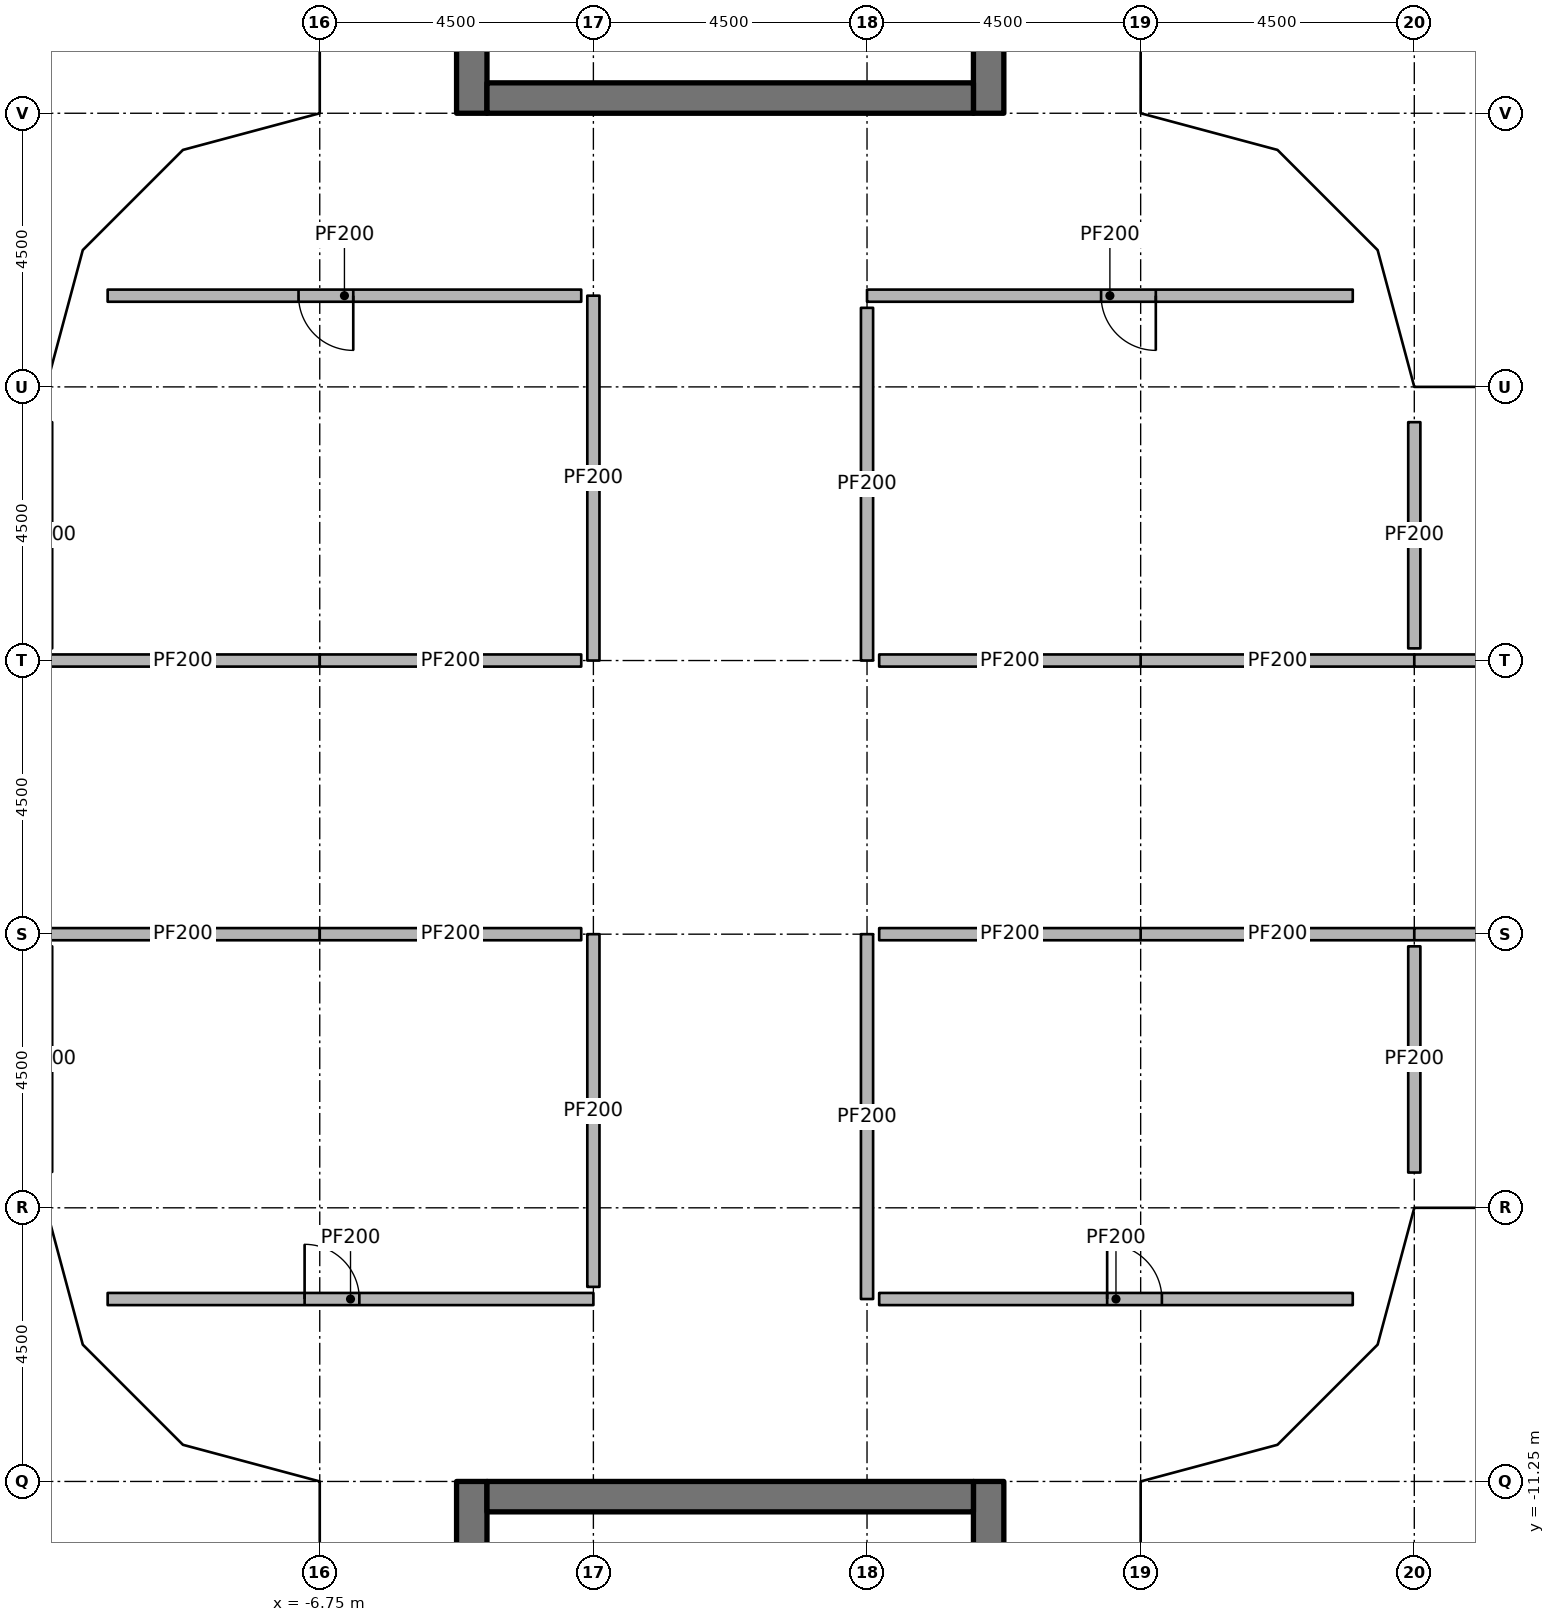
"""IFC4 building model, lengths in metres.
Left out: names, types, materials, properties, quantities, classifications, styles, units other than length and angle.
Written with IfcOpenShell. Run it as: python <this file> out.ifc"""

import sys

from ifc_helpers import new_model, si_unit, direction, frame, frame_2d, origin, origin_2d, place, context, subcontext, project, spatial, rectangle, extrude, element, fill, save


model = new_model("IFC4")
c1 = context("Model", 3, precision=1e-05, world=origin(), true_north=direction((0.0, 1.0)))
c2 = subcontext(c1, "Body", "Model", "MODEL_VIEW")
j1 = project(units=[si_unit("LENGTHUNIT", "METRE"), si_unit("PLANEANGLEUNIT", "RADIAN")], contexts=[c1])
p1 = place(None, origin())
s1 = spatial("IfcSite", under=j1, at=p1, CompositionType="ELEMENT")
p2 = place(p1, origin())
s2 = spatial("IfcBuilding", under=s1, at=p2, CompositionType="ELEMENT")
p3 = place(p2, frame((0.0, 0.0, 291.6)))
s3 = spatial("IfcBuildingStorey", under=s2, at=p3, CompositionType="ELEMENT", Elevation=291.6)
for number, where, z_axis, x_axis in (
    (1, (-10.75, -6.25, 0.0), (0.0, 0.0, 1.0), (1.0, 0.0, 0.0)),
    (2, (-10.75, 6.25, 0.0), (0.0, 0.0, 1.0), (1.0, 0.0, 0.0)),
    (3, (-6.25, -10.75, 0.0), (0.0, 0.0, 1.0), (1.0, 0.0, 0.0)),
    (4, (-6.25, -6.25, 0.0), (0.0, 0.0, 1.0), (1.0, 0.0, 0.0)),
    (5, (-6.25, 6.25, 0.0), (0.0, 0.0, 1.0), (1.0, 0.0, 0.0)),
    (6, (-6.25, 10.75, 0.0), (0.0, 0.0, 1.0), (1.0, 0.0, 0.0)),
    (7, (6.25, -10.75, 0.0), (0.0, 0.0, 1.0), (1.0, 0.0, 0.0)),
    (8, (6.25, -6.25, 0.0), (0.0, 0.0, 1.0), (1.0, 0.0, 0.0)),
    (9, (6.25, 6.25, 0.0), (0.0, 0.0, 1.0), (1.0, 0.0, 0.0)),
    (10, (6.25, 10.75, 0.0), (0.0, 0.0, 1.0), (1.0, 0.0, 0.0)),
    (11, (10.75, -6.25, 0.0), (0.0, 0.0, 1.0), (1.0, 0.0, 0.0)),
    (12, (10.75, 6.25, 0.0), (0.0, 0.0, 1.0), (1.0, 0.0, 0.0)),
):
    element("IfcColumn", number, at=place(p3, frame(where, z_axis=z_axis, x_axis=x_axis)), inside=s3, PredefinedType="COLUMN", context=c2, shape_type="SweptSolid", body=[
        extrude(rectangle(XDim=0.6, YDim=0.6, at=origin_2d()), origin(), (0.0, 0.0, 1.0), 3.45),
    ])
p4 = place(p3, frame((-4.25, 11.25, 0.0), z_axis=(0.0, 0.0, 1.0), x_axis=(0.0, 1.0, 0.0)))
e13 = element("IfcWall", 13, at=p4, inside=s3, PredefinedType="SHEAR", context=c2, shape_type="SweptSolid", body=[
    extrude(rectangle(XDim=15.0, YDim=0.5, at=frame_2d((7.5, 0.0))), origin(), (0.0, 0.0, 1.0), 3.6),
])
p5 = place(p4, frame((7.15, 0.0, 0.0)))
e14 = element("IfcOpeningElement", 14, at=p5, cuts=e13, PredefinedType="OPENING", context=c2, shape_type="SweptSolid", body=[
    extrude(rectangle(XDim=1.5, YDim=2.3, at=frame_2d((0.75, 1.15))), frame((0.0, 0.26, 0.0), z_axis=(0.0, -1.0, 0.0), x_axis=(1.0, 0.0, 0.0)), (0.0, 0.0, 1.0), 0.52),
])
p6 = place(p4, frame((13.9, 0.0, 0.0)))
e15 = element("IfcOpeningElement", 15, at=p6, cuts=e13, PredefinedType="OPENING", context=c2, shape_type="SweptSolid", body=[
    extrude(rectangle(XDim=0.9, YDim=2.1, at=frame_2d((0.45, 1.05))), frame((0.0, 0.26, 0.0), z_axis=(0.0, -1.0, 0.0), x_axis=(1.0, 0.0, 0.0)), (0.0, 0.0, 1.0), 0.52),
])
p7 = place(p4, frame((1.15, 0.0, 0.0)))
e16 = element("IfcOpeningElement", 16, at=p7, cuts=e13, PredefinedType="OPENING", context=c2, shape_type="SweptSolid", body=[
    extrude(rectangle(XDim=1.2, YDim=2.1, at=frame_2d((0.6, 1.05))), frame((0.0, 0.26, 0.0), z_axis=(0.0, -1.0, 0.0), x_axis=(1.0, 0.0, 0.0)), (0.0, 0.0, 1.0), 0.52),
])
p8 = place(p3, frame((4.25, 11.25, 0.0), z_axis=(0.0, 0.0, 1.0), x_axis=(0.0, 1.0, 0.0)))
e17 = element("IfcWall", 17, at=p8, inside=s3, PredefinedType="SHEAR", context=c2, shape_type="SweptSolid", body=[
    extrude(rectangle(XDim=15.0, YDim=0.5, at=frame_2d((7.5, 0.0))), origin(), (0.0, 0.0, 1.0), 3.6),
])
p9 = place(p8, frame((7.15, 0.0, 0.0)))
e18 = element("IfcOpeningElement", 18, at=p9, cuts=e17, PredefinedType="OPENING", context=c2, shape_type="SweptSolid", body=[
    extrude(rectangle(XDim=1.5, YDim=2.3, at=frame_2d((0.75, 1.15))), frame((0.0, 0.26, 0.0), z_axis=(0.0, -1.0, 0.0), x_axis=(1.0, 0.0, 0.0)), (0.0, 0.0, 1.0), 0.52),
])
p10 = place(p8, frame((5.55, 0.0, 0.0)))
e19 = element("IfcOpeningElement", 19, at=p10, cuts=e17, PredefinedType="OPENING", context=c2, shape_type="SweptSolid", body=[
    extrude(rectangle(XDim=1.2, YDim=2.1, at=frame_2d((0.6, 1.05))), frame((0.0, 0.26, 0.0), z_axis=(0.0, -1.0, 0.0), x_axis=(1.0, 0.0, 0.0)), (0.0, 0.0, 1.0), 0.52),
])
p11 = place(p3, frame((-4.0, 11.5, 0.0), z_axis=(0.0, 0.0, 1.0), x_axis=(1.0, 0.0, 0.0)))
e20 = element("IfcWall", 20, at=p11, inside=s3, PredefinedType="SHEAR", context=c2, shape_type="SweptSolid", body=[
    extrude(rectangle(XDim=8.0, YDim=0.5, at=frame_2d((4.0, 0.0))), origin(), (0.0, 0.0, 1.0), 3.6),
])
p12 = place(p3, frame((-4.25, -11.25, 0.0), z_axis=(0.0, 0.0, 1.0), x_axis=(0.0, -1.0, 0.0)))
e21 = element("IfcWall", 21, at=p12, inside=s3, PredefinedType="SHEAR", context=c2, shape_type="SweptSolid", body=[
    extrude(rectangle(XDim=15.0, YDim=0.5, at=frame_2d((7.5, 0.0))), origin(), (0.0, 0.0, 1.0), 3.6),
])
p13 = place(p12, frame((7.15, 0.0, 0.0)))
e22 = element("IfcOpeningElement", 22, at=p13, cuts=e21, PredefinedType="OPENING", context=c2, shape_type="SweptSolid", body=[
    extrude(rectangle(XDim=1.5, YDim=2.3, at=frame_2d((0.75, 1.15))), frame((0.0, 0.26, 0.0), z_axis=(0.0, -1.0, 0.0), x_axis=(1.0, 0.0, 0.0)), (0.0, 0.0, 1.0), 0.52),
])
p14 = place(p12, frame((5.55, 0.0, 0.0)))
e23 = element("IfcOpeningElement", 23, at=p14, cuts=e21, PredefinedType="OPENING", context=c2, shape_type="SweptSolid", body=[
    extrude(rectangle(XDim=1.2, YDim=2.1, at=frame_2d((0.6, 1.05))), frame((0.0, 0.26, 0.0), z_axis=(0.0, -1.0, 0.0), x_axis=(1.0, 0.0, 0.0)), (0.0, 0.0, 1.0), 0.52),
])
p15 = place(p3, frame((4.25, -11.25, 0.0), z_axis=(0.0, 0.0, 1.0), x_axis=(0.0, -1.0, 0.0)))
e24 = element("IfcWall", 24, at=p15, inside=s3, PredefinedType="SHEAR", context=c2, shape_type="SweptSolid", body=[
    extrude(rectangle(XDim=15.0, YDim=0.5, at=frame_2d((7.5, 0.0))), origin(), (0.0, 0.0, 1.0), 3.6),
])
p16 = place(p15, frame((7.15, 0.0, 0.0)))
e25 = element("IfcOpeningElement", 25, at=p16, cuts=e24, PredefinedType="OPENING", context=c2, shape_type="SweptSolid", body=[
    extrude(rectangle(XDim=1.5, YDim=2.3, at=frame_2d((0.75, 1.15))), frame((0.0, 0.26, 0.0), z_axis=(0.0, -1.0, 0.0), x_axis=(1.0, 0.0, 0.0)), (0.0, 0.0, 1.0), 0.52),
])
p17 = place(p15, frame((13.9, 0.0, 0.0)))
e26 = element("IfcOpeningElement", 26, at=p17, cuts=e24, PredefinedType="OPENING", context=c2, shape_type="SweptSolid", body=[
    extrude(rectangle(XDim=0.9, YDim=2.1, at=frame_2d((0.45, 1.05))), frame((0.0, 0.26, 0.0), z_axis=(0.0, -1.0, 0.0), x_axis=(1.0, 0.0, 0.0)), (0.0, 0.0, 1.0), 0.52),
])
p18 = place(p15, frame((1.15, 0.0, 0.0)))
e27 = element("IfcOpeningElement", 27, at=p18, cuts=e24, PredefinedType="OPENING", context=c2, shape_type="SweptSolid", body=[
    extrude(rectangle(XDim=1.2, YDim=2.1, at=frame_2d((0.6, 1.05))), frame((0.0, 0.26, 0.0), z_axis=(0.0, -1.0, 0.0), x_axis=(1.0, 0.0, 0.0)), (0.0, 0.0, 1.0), 0.52),
])
p19 = place(p3, frame((-4.0, -11.5, 0.0), z_axis=(0.0, 0.0, 1.0), x_axis=(1.0, 0.0, 0.0)))
e28 = element("IfcWall", 28, at=p19, inside=s3, PredefinedType="SHEAR", context=c2, shape_type="SweptSolid", body=[
    extrude(rectangle(XDim=8.0, YDim=0.5, at=frame_2d((4.0, 0.0))), origin(), (0.0, 0.0, 1.0), 3.6),
])
p20 = place(p3, frame((10.238, 8.25, 0.0), z_axis=(0.0, 0.0, 1.0), x_axis=(-1.0, 0.0, 0.0)))
e29 = element("IfcWall", 29, at=p20, inside=s3, PredefinedType="PARTITIONING", context=c2, shape_type="SweptSolid", body=[
    extrude(rectangle(XDim=7.988, YDim=0.2, at=frame_2d((3.994, 0.0))), origin(), (0.0, 0.0, 1.0), 3.45),
])
p21 = place(p20, frame((3.239, 0.0, 0.0)))
e30 = element("IfcOpeningElement", 30, at=p21, cuts=e29, PredefinedType="OPENING", context=c2, shape_type="SweptSolid", body=[
    extrude(rectangle(XDim=0.9, YDim=2.1, at=frame_2d((0.45, 1.05))), frame((0.0, 0.11, 0.0), z_axis=(0.0, -1.0, 0.0), x_axis=(1.0, 0.0, 0.0)), (0.0, 0.0, 1.0), 0.22),
])
p22 = place(p3, frame((2.25, 8.05, 0.0), z_axis=(0.0, 0.0, 1.0), x_axis=(0.0, -1.0, 0.0)))
e31 = element("IfcWall", 31, at=p22, inside=s3, PredefinedType="PARTITIONING", context=c2, shape_type="SweptSolid", body=[
    extrude(rectangle(XDim=5.8, YDim=0.2, at=frame_2d((2.9, 0.0))), origin(), (0.0, 0.0, 1.0), 2.681),
])
p23 = place(p3, frame((2.25, -2.25, 0.0), z_axis=(0.0, 0.0, 1.0), x_axis=(0.0, -1.0, 0.0)))
e32 = element("IfcWall", 32, at=p23, inside=s3, PredefinedType="PARTITIONING", context=c2, shape_type="SweptSolid", body=[
    extrude(rectangle(XDim=6.0, YDim=0.2, at=frame_2d((3.0, 0.0))), origin(), (0.0, 0.0, 1.0), 2.681),
])
p24 = place(p3, frame((2.45, -8.25, 0.0), z_axis=(0.0, 0.0, 1.0), x_axis=(1.0, 0.0, 0.0)))
e33 = element("IfcWall", 33, at=p24, inside=s3, PredefinedType="PARTITIONING", context=c2, shape_type="SweptSolid", body=[
    extrude(rectangle(XDim=7.788, YDim=0.2, at=frame_2d((3.894, 0.0))), origin(), (0.0, 0.0, 1.0), 3.45),
])
p25 = place(p24, frame((3.749, 0.0, 0.0)))
e34 = element("IfcOpeningElement", 34, at=p25, cuts=e33, PredefinedType="OPENING", context=c2, shape_type="SweptSolid", body=[
    extrude(rectangle(XDim=0.9, YDim=2.1, at=frame_2d((0.45, 1.05))), frame((0.0, 0.11, 0.0), z_axis=(0.0, -1.0, 0.0), x_axis=(1.0, 0.0, 0.0)), (0.0, 0.0, 1.0), 0.22),
])
p26 = place(p3, frame((-2.25, 2.25, 0.0), z_axis=(0.0, 0.0, 1.0), x_axis=(0.0, 1.0, 0.0)))
e35 = element("IfcWall", 35, at=p26, inside=s3, PredefinedType="PARTITIONING", context=c2, shape_type="SweptSolid", body=[
    extrude(rectangle(XDim=6.0, YDim=0.2, at=frame_2d((3.0, 0.0))), origin(), (0.0, 0.0, 1.0), 2.681),
])
p27 = place(p3, frame((-2.45, 8.25, 0.0), z_axis=(0.0, 0.0, 1.0), x_axis=(-1.0, 0.0, 0.0)))
e36 = element("IfcWall", 36, at=p27, inside=s3, PredefinedType="PARTITIONING", context=c2, shape_type="SweptSolid", body=[
    extrude(rectangle(XDim=7.788, YDim=0.2, at=frame_2d((3.894, 0.0))), origin(), (0.0, 0.0, 1.0), 3.45),
])
p28 = place(p27, frame((3.749, 0.0, 0.0)))
e37 = element("IfcOpeningElement", 37, at=p28, cuts=e36, PredefinedType="OPENING", context=c2, shape_type="SweptSolid", body=[
    extrude(rectangle(XDim=0.9, YDim=2.1, at=frame_2d((0.45, 1.05))), frame((0.0, 0.11, 0.0), z_axis=(0.0, -1.0, 0.0), x_axis=(1.0, 0.0, 0.0)), (0.0, 0.0, 1.0), 0.22),
])
p29 = place(p3, frame((-10.238, -8.25, 0.0), z_axis=(0.0, 0.0, 1.0), x_axis=(1.0, 0.0, 0.0)))
e38 = element("IfcWall", 38, at=p29, inside=s3, PredefinedType="PARTITIONING", context=c2, shape_type="SweptSolid", body=[
    extrude(rectangle(XDim=7.988, YDim=0.2, at=frame_2d((3.994, 0.0))), origin(), (0.0, 0.0, 1.0), 3.45),
])
p30 = place(p29, frame((3.239, 0.0, 0.0)))
e39 = element("IfcOpeningElement", 39, at=p30, cuts=e38, PredefinedType="OPENING", context=c2, shape_type="SweptSolid", body=[
    extrude(rectangle(XDim=0.9, YDim=2.1, at=frame_2d((0.45, 1.05))), frame((0.0, 0.11, 0.0), z_axis=(0.0, -1.0, 0.0), x_axis=(1.0, 0.0, 0.0)), (0.0, 0.0, 1.0), 0.22),
])
p31 = place(p3, frame((-2.25, -8.05, 0.0), z_axis=(0.0, 0.0, 1.0), x_axis=(0.0, 1.0, 0.0)))
e40 = element("IfcWall", 40, at=p31, inside=s3, PredefinedType="PARTITIONING", context=c2, shape_type="SweptSolid", body=[
    extrude(rectangle(XDim=5.8, YDim=0.2, at=frame_2d((2.9, 0.0))), origin(), (0.0, 0.0, 1.0), 2.681),
])
p32 = place(p3, frame((11.25, 2.25, 0.0), z_axis=(0.0, 0.0, 1.0), x_axis=(-1.0, 0.0, 0.0)))
e41 = element("IfcWall", 41, at=p32, inside=s3, PredefinedType="PARTITIONING", context=c2, shape_type="SweptSolid", body=[
    extrude(rectangle(XDim=4.5, YDim=0.2, at=frame_2d((2.25, 0.0))), origin(), (0.0, 0.0, 1.0), 2.828),
])
p33 = place(p3, frame((11.25, 6.17, 0.0), z_axis=(0.0, 0.0, 1.0), x_axis=(0.0, -1.0, 0.0)))
e42 = element("IfcWall", 42, at=p33, inside=s3, PredefinedType="PARTITIONING", context=c2, shape_type="SweptSolid", body=[
    extrude(rectangle(XDim=3.72, YDim=0.2, at=frame_2d((1.86, 0.0))), origin(), (0.0, 0.0, 1.0), 3.45),
])
p34 = place(p3, frame((6.75, 2.25, 0.0), z_axis=(0.0, 0.0, 1.0), x_axis=(-1.0, 0.0, 0.0)))
e43 = element("IfcWall", 43, at=p34, inside=s3, PredefinedType="PARTITIONING", context=c2, shape_type="SweptSolid", body=[
    extrude(rectangle(XDim=4.3, YDim=0.2, at=frame_2d((2.15, 0.0))), origin(), (0.0, 0.0, 1.0), 2.828),
])
p35 = place(p3, frame((6.75, -2.25, 0.0), z_axis=(0.0, 0.0, 1.0), x_axis=(1.0, 0.0, 0.0)))
e44 = element("IfcWall", 44, at=p35, inside=s3, PredefinedType="PARTITIONING", context=c2, shape_type="SweptSolid", body=[
    extrude(rectangle(XDim=4.5, YDim=0.2, at=frame_2d((2.25, 0.0))), origin(), (0.0, 0.0, 1.0), 2.828),
])
p36 = place(p3, frame((11.25, -2.45, 0.0), z_axis=(0.0, 0.0, 1.0), x_axis=(0.0, -1.0, 0.0)))
e45 = element("IfcWall", 45, at=p36, inside=s3, PredefinedType="PARTITIONING", context=c2, shape_type="SweptSolid", body=[
    extrude(rectangle(XDim=3.72, YDim=0.2, at=frame_2d((1.86, 0.0))), origin(), (0.0, 0.0, 1.0), 3.45),
])
p37 = place(p3, frame((2.45, -2.25, 0.0), z_axis=(0.0, 0.0, 1.0), x_axis=(1.0, 0.0, 0.0)))
e46 = element("IfcWall", 46, at=p37, inside=s3, PredefinedType="PARTITIONING", context=c2, shape_type="SweptSolid", body=[
    extrude(rectangle(XDim=4.3, YDim=0.2, at=frame_2d((2.15, 0.0))), origin(), (0.0, 0.0, 1.0), 2.828),
])
p38 = place(p3, frame((-6.75, 2.25, 0.0), z_axis=(0.0, 0.0, 1.0), x_axis=(-1.0, 0.0, 0.0)))
e47 = element("IfcWall", 47, at=p38, inside=s3, PredefinedType="PARTITIONING", context=c2, shape_type="SweptSolid", body=[
    extrude(rectangle(XDim=4.5, YDim=0.2, at=frame_2d((2.25, 0.0))), origin(), (0.0, 0.0, 1.0), 2.828),
])
p39 = place(p3, frame((-2.45, 2.25, 0.0), z_axis=(0.0, 0.0, 1.0), x_axis=(-1.0, 0.0, 0.0)))
e48 = element("IfcWall", 48, at=p39, inside=s3, PredefinedType="PARTITIONING", context=c2, shape_type="SweptSolid", body=[
    extrude(rectangle(XDim=4.3, YDim=0.2, at=frame_2d((2.15, 0.0))), origin(), (0.0, 0.0, 1.0), 2.828),
])
p40 = place(p3, frame((-11.25, -2.25, 0.0), z_axis=(0.0, 0.0, 1.0), x_axis=(1.0, 0.0, 0.0)))
e49 = element("IfcWall", 49, at=p40, inside=s3, PredefinedType="PARTITIONING", context=c2, shape_type="SweptSolid", body=[
    extrude(rectangle(XDim=4.5, YDim=0.2, at=frame_2d((2.25, 0.0))), origin(), (0.0, 0.0, 1.0), 2.828),
])
p41 = place(p3, frame((-6.75, -2.25, 0.0), z_axis=(0.0, 0.0, 1.0), x_axis=(1.0, 0.0, 0.0)))
e50 = element("IfcWall", 50, at=p41, inside=s3, PredefinedType="PARTITIONING", context=c2, shape_type="SweptSolid", body=[
    extrude(rectangle(XDim=4.3, YDim=0.2, at=frame_2d((2.15, 0.0))), origin(), (0.0, 0.0, 1.0), 2.828),
])
p42 = place(p3, frame((11.25, 2.25, 0.0), z_axis=(0.0, 0.0, 1.0), x_axis=(1.0, 0.0, 0.0)))
e51 = element("IfcWall", 51, at=p42, inside=s3, PredefinedType="PARTITIONING", context=c2, shape_type="SweptSolid", body=[
    extrude(rectangle(XDim=12.89, YDim=0.2, at=frame_2d((6.445, 0.0))), origin(), (0.0, 0.0, 1.0), 2.53),
])
p43 = place(p42, frame((6.3, 0.0, 0.0)))
e52 = element("IfcOpeningElement", 52, at=p43, cuts=e51, PredefinedType="OPENING", context=c2, shape_type="SweptSolid", body=[
    extrude(rectangle(XDim=0.9, YDim=2.1, at=frame_2d((0.45, 1.05))), frame((0.0, 0.11, 0.0), z_axis=(0.0, -1.0, 0.0), x_axis=(1.0, 0.0, 0.0)), (0.0, 0.0, 1.0), 0.22),
])
p44 = place(p3, frame((24.14, -2.25, 0.0), z_axis=(0.0, 0.0, 1.0), x_axis=(-1.0, 0.0, 0.0)))
e53 = element("IfcWall", 53, at=p44, inside=s3, PredefinedType="PARTITIONING", context=c2, shape_type="SweptSolid", body=[
    extrude(rectangle(XDim=12.89, YDim=0.2, at=frame_2d((6.445, 0.0))), origin(), (0.0, 0.0, 1.0), 2.53),
])
p45 = place(p44, frame((5.69, 0.0, 0.0)))
e54 = element("IfcOpeningElement", 54, at=p45, cuts=e53, PredefinedType="OPENING", context=c2, shape_type="SweptSolid", body=[
    extrude(rectangle(XDim=0.9, YDim=2.1, at=frame_2d((0.45, 1.05))), frame((0.0, 0.11, 0.0), z_axis=(0.0, -1.0, 0.0), x_axis=(1.0, 0.0, 0.0)), (0.0, 0.0, 1.0), 0.22),
])
p46 = place(p21, origin())
e55 = element("IfcDoor", 55, at=p46, inside=s3, OperationType="SINGLE_SWING_LEFT", PredefinedType="DOOR", context=c2, shape_type="SweptSolid", body=[
    extrude(rectangle(XDim=0.9, YDim=2.1, at=frame_2d((0.45, 1.05))), frame((0.0, 0.025, 0.0), z_axis=(0.0, -1.0, 0.0), x_axis=(1.0, 0.0, 0.0)), (0.0, 0.0, 1.0), 0.05),
])
fill(e30, e55)
p47 = place(p25, origin())
e56 = element("IfcDoor", 56, at=p47, inside=s3, OperationType="SINGLE_SWING_LEFT", PredefinedType="DOOR", context=c2, shape_type="SweptSolid", body=[
    extrude(rectangle(XDim=0.9, YDim=2.1, at=frame_2d((0.45, 1.05))), frame((0.0, 0.025, 0.0), z_axis=(0.0, -1.0, 0.0), x_axis=(1.0, 0.0, 0.0)), (0.0, 0.0, 1.0), 0.05),
])
fill(e34, e56)
p48 = place(p28, origin())
e57 = element("IfcDoor", 57, at=p48, inside=s3, OperationType="SINGLE_SWING_LEFT", PredefinedType="DOOR", context=c2, shape_type="SweptSolid", body=[
    extrude(rectangle(XDim=0.9, YDim=2.1, at=frame_2d((0.45, 1.05))), frame((0.0, 0.025, 0.0), z_axis=(0.0, -1.0, 0.0), x_axis=(1.0, 0.0, 0.0)), (0.0, 0.0, 1.0), 0.05),
])
fill(e37, e57)
p49 = place(p30, origin())
e58 = element("IfcDoor", 58, at=p49, inside=s3, OperationType="SINGLE_SWING_LEFT", PredefinedType="DOOR", context=c2, shape_type="SweptSolid", body=[
    extrude(rectangle(XDim=0.9, YDim=2.1, at=frame_2d((0.45, 1.05))), frame((0.0, 0.025, 0.0), z_axis=(0.0, -1.0, 0.0), x_axis=(1.0, 0.0, 0.0)), (0.0, 0.0, 1.0), 0.05),
])
fill(e39, e58)
save(model, sys.argv[1])
